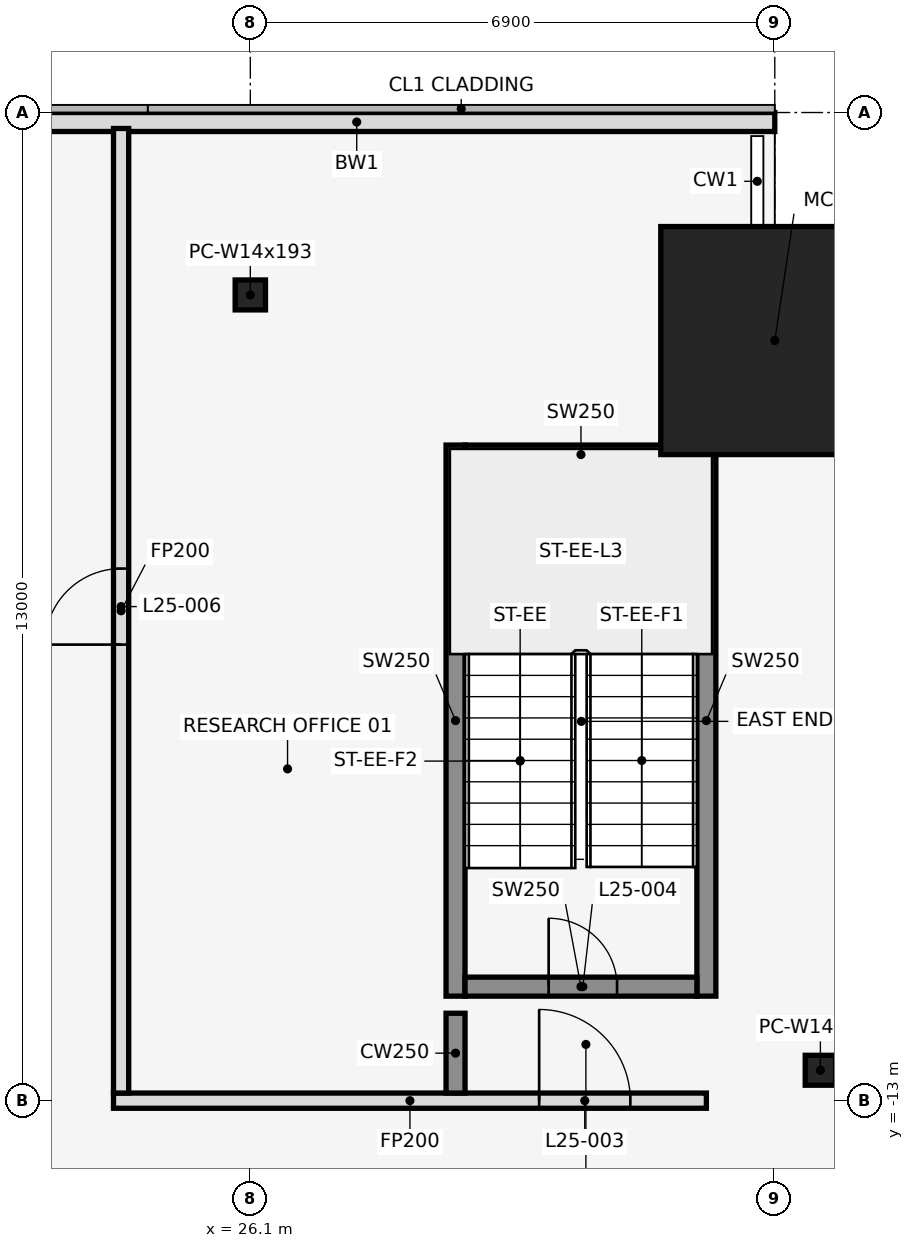
"""IFC4 building model, lengths in metres.
Left out: names, types, materials, properties, quantities, classifications, styles, units other than length and angle.
Written with IfcOpenShell. Run it as: python <this file> out.ifc"""

import sys

from ifc_helpers import new_model, si_unit, direction, frame, frame_2d, origin, origin_2d, place, context, subcontext, project, spatial, rectangle, hollow_rectangle, i_section, extrude, element, fill, save


model = new_model("IFC4")
c1 = context("Model", 3, precision=1e-05, world=origin(), true_north=direction((0.0, 1.0)))
c2 = subcontext(c1, "Body", "Model", "MODEL_VIEW")
j1 = project(units=[si_unit("LENGTHUNIT", "METRE"), si_unit("PLANEANGLEUNIT", "RADIAN")], contexts=[c1])
p1 = place(None, origin())
s1 = spatial("IfcSite", under=j1, at=p1, CompositionType="ELEMENT")
p2 = place(p1, origin())
s2 = spatial("IfcBuilding", under=s1, at=p2, CompositionType="ELEMENT")
p3 = place(p2, frame((0.0, 0.0, 118.6)))
s3 = spatial("IfcBuildingStorey", under=s2, at=p3, CompositionType="ELEMENT", Elevation=118.6)
p4 = place(p3, frame((26.1, -2.4, 0.0), z_axis=(0.0, 0.0, 1.0), x_axis=(1.0, 0.0, 0.0)))
e1 = element("IfcColumn", 1, at=p4, inside=s3, PredefinedType="COLUMN", context=c2, shape_type="SweptSolid", body=[
    extrude(i_section(OverallWidth=0.399, OverallDepth=0.394, WebThickness=0.023, FlangeThickness=0.037, at=origin_2d()), origin(), (0.0, 0.0, 1.0), 4.1),
])
p5 = place(p3, frame((33.0, -3.0, 0.0), z_axis=(0.0, 0.0, 1.0), x_axis=(1.0, 0.0, 0.0)))
e2 = element("IfcColumn", 2, at=p5, inside=s3, PredefinedType="COLUMN", context=c2, shape_type="SweptSolid", body=[
    extrude(hollow_rectangle(XDim=3.0, YDim=3.0, WallThickness=0.09, at=origin_2d()), origin(), (0.0, 0.0, 1.0), 4.1),
])
p6 = place(p3, frame((33.6, -12.6, 0.0), z_axis=(0.0, 0.0, 1.0), x_axis=(1.0, 0.0, 0.0)))
e3 = element("IfcColumn", 3, at=p6, inside=s3, PredefinedType="COLUMN", context=c2, shape_type="SweptSolid", body=[
    extrude(i_section(OverallWidth=0.399, OverallDepth=0.394, WebThickness=0.023, FlangeThickness=0.037, at=origin_2d()), origin(), (0.0, 0.0, 1.0), 4.1),
])
p7 = place(p3, frame((33.0, -0.125, 0.0), z_axis=(0.0, 0.0, 1.0), x_axis=(-1.0, 0.0, 0.0)))
e4 = element("IfcWall", 4, at=p7, inside=s3, PredefinedType="STANDARD", context=c2, shape_type="SweptSolid", body=[
    extrude(rectangle(XDim=11.0, YDim=0.25, at=frame_2d((5.5, 0.0))), origin(), (0.0, 0.0, 1.0), 3.95),
])
for number, where, z_axis, x_axis in (
    (5, (28.8, -11.625, 0.0), (0.0, 0.0, 1.0), (0.0, 1.0, 0.0)),
    (6, (32.1, -11.625, 0.0), (0.0, 0.0, 1.0), (0.0, 1.0, 0.0)),
):
    element("IfcWall", number, at=place(p3, frame(where, z_axis=z_axis, x_axis=x_axis)), inside=s3, PredefinedType="SHEAR", context=c2, shape_type="SweptSolid", body=[
        extrude(rectangle(XDim=7.25, YDim=0.25, at=frame_2d((3.625, 0.0))), origin(), (0.0, 0.0, 1.0), 4.1),
    ])
p8 = place(p3, frame((28.925, -11.5, 0.0), z_axis=(0.0, 0.0, 1.0), x_axis=(1.0, 0.0, 0.0)))
e7 = element("IfcWall", 7, at=p8, inside=s3, PredefinedType="SHEAR", context=c2, shape_type="SweptSolid", body=[
    extrude(rectangle(XDim=3.05, YDim=0.25, at=frame_2d((1.525, 0.0))), origin(), (0.0, 0.0, 1.0), 4.1),
])
p9 = place(p8, frame((1.1, 0.0, 0.0)))
e8 = element("IfcOpeningElement", 8, at=p9, cuts=e7, PredefinedType="OPENING", context=c2, shape_type="SweptSolid", body=[
    extrude(rectangle(XDim=0.9, YDim=2.1, at=frame_2d((0.45, 1.05))), frame((0.0, 0.137, 0.0), z_axis=(0.0, -1.0, 0.0), x_axis=(1.0, 0.0, 0.0)), (0.0, 0.0, 1.0), 0.274),
])
p10 = place(p3, frame((28.925, -4.5, 0.0), z_axis=(0.0, 0.0, 1.0), x_axis=(1.0, 0.0, 0.0)))
e9 = element("IfcWall", 9, at=p10, inside=s3, PredefinedType="SHEAR", context=c2, shape_type="SweptSolid", body=[
    extrude(rectangle(XDim=3.05, YDim=0.25, at=frame_2d((1.525, 0.0))), origin(), (0.0, 0.0, 1.0), 4.1),
])
p11 = place(p3, frame((24.3, -13.0, 0.0), z_axis=(0.0, 0.0, 1.0), x_axis=(1.0, 0.0, 0.0)))
e10 = element("IfcWall", 10, at=p11, inside=s3, PredefinedType="PARTITIONING", context=c2, shape_type="SweptSolid", body=[
    extrude(rectangle(XDim=7.8, YDim=0.2, at=frame_2d((3.9, 0.0))), origin(), (0.0, 0.0, 1.0), 3.018),
])
p12 = place(p11, frame((5.6, 0.0, 0.0)))
e11 = element("IfcOpeningElement", 11, at=p12, cuts=e10, PredefinedType="OPENING", context=c2, shape_type="SweptSolid", body=[
    extrude(rectangle(XDim=1.2, YDim=2.1, at=frame_2d((0.6, 1.05))), frame((0.0, 0.112, 0.0), z_axis=(0.0, -1.0, 0.0), x_axis=(1.0, 0.0, 0.0)), (0.0, 0.0, 1.0), 0.224),
])
p13 = place(p3, frame((24.4, -12.9, 0.0), z_axis=(0.0, 0.0, 1.0), x_axis=(0.0, 1.0, 0.0)))
e12 = element("IfcWall", 12, at=p13, inside=s3, PredefinedType="PARTITIONING", context=c2, shape_type="SweptSolid", body=[
    extrude(rectangle(XDim=12.69, YDim=0.2, at=frame_2d((6.345, 0.0))), origin(), (0.0, 0.0, 1.0), 3.018),
])
p14 = place(p13, frame((5.9, 0.0, 0.0)))
e13 = element("IfcOpeningElement", 13, at=p14, cuts=e12, PredefinedType="OPENING", context=c2, shape_type="SweptSolid", body=[
    extrude(rectangle(XDim=1.0, YDim=2.1, at=frame_2d((0.5, 1.05))), frame((0.0, 0.112, 0.0), z_axis=(0.0, -1.0, 0.0), x_axis=(1.0, 0.0, 0.0)), (0.0, 0.0, 1.0), 0.224),
])
p15 = place(p3, frame((28.8, -12.9, 0.0), z_axis=(0.0, 0.0, 1.0), x_axis=(0.0, 1.0, 0.0)))
e14 = element("IfcWall", 14, at=p15, inside=s3, PredefinedType="SHEAR", context=c2, shape_type="SweptSolid", body=[
    extrude(rectangle(XDim=1.05, YDim=0.25, at=frame_2d((0.525, 0.0))), origin(), (0.0, 0.0, 1.0), 4.1),
])
p16 = place(p12, origin())
e15 = element("IfcDoor", 15, at=p16, inside=s3, OperationType="SINGLE_SWING_RIGHT", PredefinedType="DOOR", context=c2, shape_type="SweptSolid", body=[
    extrude(rectangle(XDim=1.2, YDim=2.1, at=frame_2d((0.6, 1.05))), frame((0.0, 0.025, 0.0), z_axis=(0.0, -1.0, 0.0), x_axis=(1.0, 0.0, 0.0)), (0.0, 0.0, 1.0), 0.05),
])
fill(e11, e15)
p17 = place(p9, origin())
e16 = element("IfcDoor", 16, at=p17, inside=s3, OperationType="SINGLE_SWING_LEFT", PredefinedType="DOOR", context=c2, shape_type="SweptSolid", body=[
    extrude(rectangle(XDim=0.9, YDim=2.1, at=frame_2d((0.45, 1.05))), frame((0.0, 0.025, 0.0), z_axis=(0.0, -1.0, 0.0), x_axis=(1.0, 0.0, 0.0)), (0.0, 0.0, 1.0), 0.05),
])
fill(e8, e16)
p18 = place(p14, frame((1.0, 0.0, 0.0), z_axis=(0.0, 0.0, 1.0), x_axis=(-1.0, 0.0, 0.0)))
e17 = element("IfcDoor", 17, at=p18, inside=s3, OperationType="SINGLE_SWING_RIGHT", PredefinedType="DOOR", context=c2, shape_type="SweptSolid", body=[
    extrude(rectangle(XDim=1.0, YDim=2.1, at=frame_2d((0.5, 1.05))), frame((0.0, 0.025, 0.0), z_axis=(0.0, -1.0, 0.0), x_axis=(1.0, 0.0, 0.0)), (0.0, 0.0, 1.0), 0.05),
])
fill(e13, e17)
save(model, sys.argv[1])
